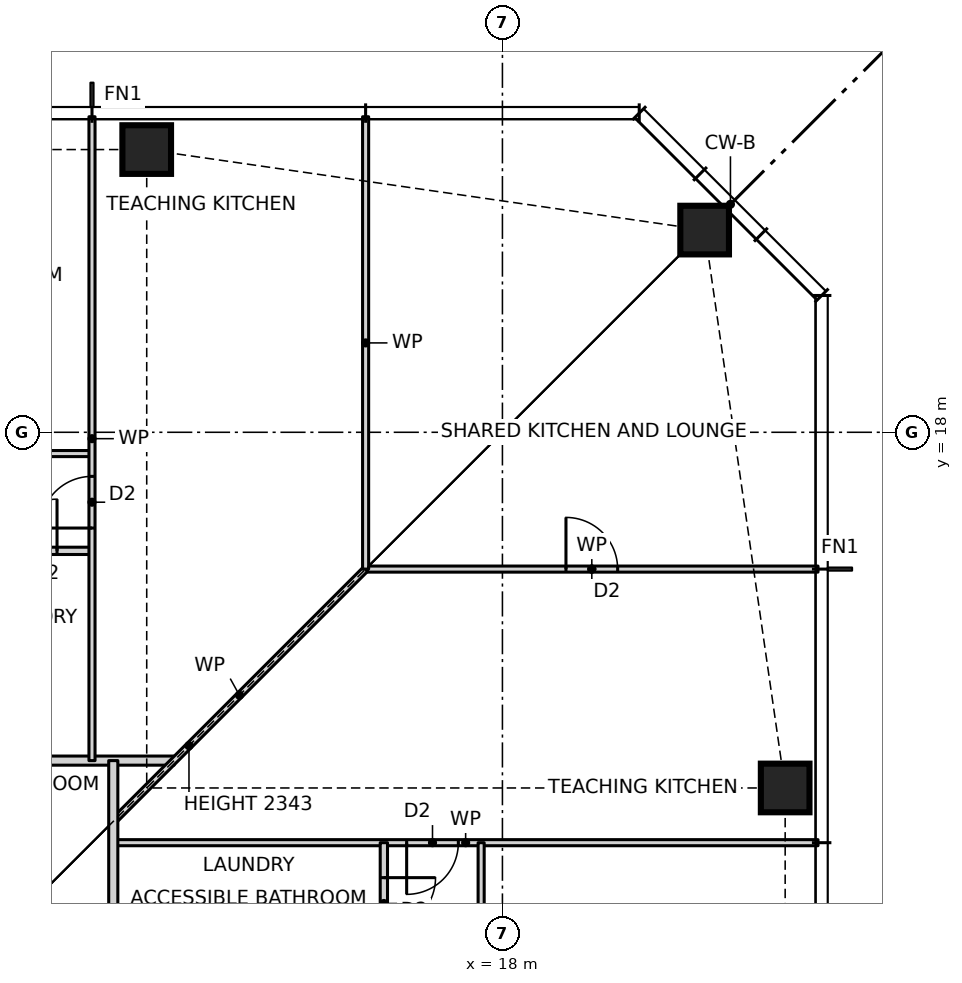
"""IFC4 building model, lengths in metres.
Left out: names, types, materials, properties, quantities, classifications, styles, units other than length and angle.
Written with IfcOpenShell. Run it as: python <this file> out.ifc"""

import sys

from ifc_helpers import new_model, si_unit, direction, frame, frame_2d, origin, origin_2d, place, context, subcontext, project, spatial, rectangle, hollow_rectangle, extrude, element, fill, save


model = new_model("IFC4")
c1 = context("Model", 3, precision=1e-05, world=origin(), true_north=direction((0.0, 1.0)))
c2 = subcontext(c1, "Body", "Model", "MODEL_VIEW")
j1 = project(units=[si_unit("LENGTHUNIT", "METRE"), si_unit("PLANEANGLEUNIT", "RADIAN")], contexts=[c1])
p1 = place(None, origin())
s1 = spatial("IfcSite", under=j1, at=p1, CompositionType="ELEMENT")
p2 = place(p1, origin())
s2 = spatial("IfcBuilding", under=s1, at=p2, CompositionType="ELEMENT")
p3 = place(p2, frame((0.0, 0.0, 60.5)))
s3 = spatial("IfcBuildingStorey", under=s2, at=p3, CompositionType="ELEMENT", Elevation=60.5)
for number, where, z_axis, x_axis in (
    (1, (22.65, 12.15, 0.0), (0.0, 0.0, 1.0), (1.0, 0.0, 0.0)),
    (2, (21.326, 21.326, 0.0), (0.0, 0.0, 1.0), (1.0, 0.0, 0.0)),
    (3, (12.15, 22.65, 0.0), (0.0, 0.0, 1.0), (1.0, 0.0, 0.0)),
):
    element("IfcColumn", number, at=place(p3, frame(where, z_axis=z_axis, x_axis=x_axis)), inside=s3, PredefinedType="COLUMN", context=c2, shape_type="SweptSolid", body=[
        extrude(hollow_rectangle(XDim=0.8, YDim=0.8, WallThickness=0.09, at=origin_2d()), origin(), (0.0, 0.0, 1.0), 3.5),
    ])
p4 = place(p3, frame((11.6, 11.25, 0.0), z_axis=(0.0, 0.0, 1.0), x_axis=(1.0, 0.0, 0.0)))
e4 = element("IfcWall", 4, at=p4, inside=s3, PredefinedType="PARTITIONING", context=c2, shape_type="SweptSolid", body=[
    extrude(rectangle(XDim=11.59, YDim=0.1, at=frame_2d((5.795, 0.0))), origin(), (0.0, 0.0, 1.0), 3.27),
])
p5 = place(p4, frame((4.825, 0.0, 0.0)))
e5 = element("IfcOpeningElement", 5, at=p5, cuts=e4, PredefinedType="OPENING", context=c2, shape_type="SweptSolid", body=[
    extrude(rectangle(XDim=0.85, YDim=2.1, at=frame_2d((0.425, 1.05))), frame((0.0, 0.06, 0.0), z_axis=(0.0, -1.0, 0.0), x_axis=(1.0, 0.0, 0.0)), (0.0, 0.0, 1.0), 0.12),
])
p6 = place(p3, frame((-12.6, 12.6, 0.0), z_axis=(0.0, 0.0, 1.0), x_axis=(1.0, 0.0, 0.0)))
e6 = element("IfcWall", 6, at=p6, inside=s3, PredefinedType="PARTITIONING", context=c2, shape_type="SweptSolid", body=[
    extrude(rectangle(XDim=25.2, YDim=0.15, at=frame_2d((12.6, 0.0))), origin(), (0.0, 0.0, 1.0), 3.27),
])
p7 = place(p6, frame((11.505, 0.0, 0.0)))
e7 = element("IfcOpeningElement", 7, at=p7, cuts=e6, PredefinedType="OPENING", context=c2, shape_type="SweptSolid", body=[
    extrude(rectangle(XDim=1.0, YDim=2.1, at=frame_2d((0.5, 1.05))), frame((0.0, 0.085, 0.0), z_axis=(0.0, -1.0, 0.0), x_axis=(1.0, 0.0, 0.0)), (0.0, 0.0, 1.0), 0.17),
])
p8 = place(p3, frame((15.75, 15.75, 0.0), z_axis=(0.0, 0.0, 1.0), x_axis=(1.0, 0.0, 0.0)))
e8 = element("IfcWall", 8, at=p8, inside=s3, PredefinedType="PARTITIONING", context=c2, shape_type="SweptSolid", body=[
    extrude(rectangle(XDim=7.44, YDim=0.1, at=frame_2d((3.72, 0.0))), origin(), (0.0, 0.0, 1.0), 3.27),
])
p9 = place(p8, frame((3.295, 0.0, 0.0)))
e9 = element("IfcOpeningElement", 9, at=p9, cuts=e8, PredefinedType="OPENING", context=c2, shape_type="SweptSolid", body=[
    extrude(rectangle(XDim=0.85, YDim=2.1, at=frame_2d((0.425, 1.05))), frame((0.0, 0.06, 0.0), z_axis=(0.0, -1.0, 0.0), x_axis=(1.0, 0.0, 0.0)), (0.0, 0.0, 1.0), 0.12),
])
p10 = place(p3, frame((5.65, 16.05, 0.0), z_axis=(0.0, 0.0, 1.0), x_axis=(1.0, 0.0, 0.0)))
e10 = element("IfcWall", 10, at=p10, inside=s3, PredefinedType="PARTITIONING", context=c2, shape_type="SweptSolid", body=[
    extrude(rectangle(XDim=5.6, YDim=0.12, at=frame_2d((2.8, 0.0))), origin(), (0.0, 0.0, 1.0), 3.27),
])
p11 = place(p10, frame((4.175, 0.0, 0.0)))
e11 = element("IfcOpeningElement", 11, at=p11, cuts=e10, PredefinedType="OPENING", context=c2, shape_type="SweptSolid", body=[
    extrude(rectangle(XDim=0.85, YDim=2.1, at=frame_2d((0.425, 1.05))), frame((0.0, 0.07, 0.0), z_axis=(0.0, -1.0, 0.0), x_axis=(1.0, 0.0, 0.0)), (0.0, 0.0, 1.0), 0.14),
])
p12 = place(p10, frame((2.225, 0.0, 0.0)))
e12 = element("IfcOpeningElement", 12, at=p12, cuts=e10, PredefinedType="OPENING", context=c2, shape_type="SweptSolid", body=[
    extrude(rectangle(XDim=0.85, YDim=2.1, at=frame_2d((0.425, 1.05))), frame((0.0, 0.07, 0.0), z_axis=(0.0, -1.0, 0.0), x_axis=(1.0, 0.0, 0.0)), (0.0, 0.0, 1.0), 0.14),
])
p13 = place(p3, frame((-15.75, 17.65, 0.0), z_axis=(0.0, 0.0, 1.0), x_axis=(1.0, 0.0, 0.0)))
e13 = element("IfcWall", 13, at=p13, inside=s3, PredefinedType="PARTITIONING", context=c2, shape_type="SweptSolid", body=[
    extrude(rectangle(XDim=27.0, YDim=0.1, at=frame_2d((13.5, 0.0))), origin(), (0.0, 0.0, 1.0), 3.27),
])
p14 = place(p13, frame((24.3, 0.0, 0.0)))
e14 = element("IfcOpeningElement", 14, at=p14, cuts=e13, PredefinedType="OPENING", context=c2, shape_type="SweptSolid", body=[
    extrude(rectangle(XDim=0.9, YDim=2.1, at=frame_2d((0.45, 1.05))), frame((0.0, 0.06, 0.0), z_axis=(0.0, -1.0, 0.0), x_axis=(1.0, 0.0, 0.0)), (0.0, 0.0, 1.0), 0.12),
])
p15 = place(p13, frame((19.8, 0.0, 0.0)))
e15 = element("IfcOpeningElement", 15, at=p15, cuts=e13, PredefinedType="OPENING", context=c2, shape_type="SweptSolid", body=[
    extrude(rectangle(XDim=0.9, YDim=2.1, at=frame_2d((0.45, 1.05))), frame((0.0, 0.06, 0.0), z_axis=(0.0, -1.0, 0.0), x_axis=(1.0, 0.0, 0.0)), (0.0, 0.0, 1.0), 0.12),
])
p16 = place(p13, frame((15.3, 0.0, 0.0)))
e16 = element("IfcOpeningElement", 16, at=p16, cuts=e13, PredefinedType="OPENING", context=c2, shape_type="SweptSolid", body=[
    extrude(rectangle(XDim=0.9, YDim=2.1, at=frame_2d((0.45, 1.05))), frame((0.0, 0.06, 0.0), z_axis=(0.0, -1.0, 0.0), x_axis=(1.0, 0.0, 0.0)), (0.0, 0.0, 1.0), 0.12),
])
p17 = place(p13, frame((10.8, 0.0, 0.0)))
e17 = element("IfcOpeningElement", 17, at=p17, cuts=e13, PredefinedType="OPENING", context=c2, shape_type="SweptSolid", body=[
    extrude(rectangle(XDim=0.9, YDim=2.1, at=frame_2d((0.45, 1.05))), frame((0.0, 0.06, 0.0), z_axis=(0.0, -1.0, 0.0), x_axis=(1.0, 0.0, 0.0)), (0.0, 0.0, 1.0), 0.12),
])
p18 = place(p13, frame((6.3, 0.0, 0.0)))
e18 = element("IfcOpeningElement", 18, at=p18, cuts=e13, PredefinedType="OPENING", context=c2, shape_type="SweptSolid", body=[
    extrude(rectangle(XDim=0.9, YDim=2.1, at=frame_2d((0.45, 1.05))), frame((0.0, 0.06, 0.0), z_axis=(0.0, -1.0, 0.0), x_axis=(1.0, 0.0, 0.0)), (0.0, 0.0, 1.0), 0.12),
])
p19 = place(p13, frame((1.8, 0.0, 0.0)))
e19 = element("IfcOpeningElement", 19, at=p19, cuts=e13, PredefinedType="OPENING", context=c2, shape_type="SweptSolid", body=[
    extrude(rectangle(XDim=0.9, YDim=2.1, at=frame_2d((0.45, 1.05))), frame((0.0, 0.06, 0.0), z_axis=(0.0, -1.0, 0.0), x_axis=(1.0, 0.0, 0.0)), (0.0, 0.0, 1.0), 0.12),
])
p20 = place(p3, frame((11.6, 11.6, 0.0), z_axis=(0.0, 0.0, 1.0), x_axis=(0.707106781187, 0.707106781187, 0.0)))
e20 = element("IfcWall", 20, at=p20, inside=s3, PredefinedType="PARTITIONING", context=c2, shape_type="SweptSolid", body=[
    extrude(rectangle(XDim=5.869, YDim=0.1, at=frame_2d((2.935, 0.0))), origin(), (0.0, 0.0, 1.0), 2.343),
])
p21 = place(p3, frame((17.65, -15.75, 0.0), z_axis=(0.0, 0.0, 1.0), x_axis=(0.0, 1.0, 0.0)))
e21 = element("IfcWall", 21, at=p21, inside=s3, PredefinedType="PARTITIONING", context=c2, shape_type="SweptSolid", body=[
    extrude(rectangle(XDim=27.0, YDim=0.1, at=frame_2d((13.5, 0.0))), origin(), (0.0, 0.0, 1.0), 3.27),
])
p22 = place(p21, frame((1.8, 0.0, 0.0)))
e22 = element("IfcOpeningElement", 22, at=p22, cuts=e21, PredefinedType="OPENING", context=c2, shape_type="SweptSolid", body=[
    extrude(rectangle(XDim=0.9, YDim=2.1, at=frame_2d((0.45, 1.05))), frame((0.0, 0.06, 0.0), z_axis=(0.0, -1.0, 0.0), x_axis=(1.0, 0.0, 0.0)), (0.0, 0.0, 1.0), 0.12),
])
p23 = place(p21, frame((6.3, 0.0, 0.0)))
e23 = element("IfcOpeningElement", 23, at=p23, cuts=e21, PredefinedType="OPENING", context=c2, shape_type="SweptSolid", body=[
    extrude(rectangle(XDim=0.9, YDim=2.1, at=frame_2d((0.45, 1.05))), frame((0.0, 0.06, 0.0), z_axis=(0.0, -1.0, 0.0), x_axis=(1.0, 0.0, 0.0)), (0.0, 0.0, 1.0), 0.12),
])
p24 = place(p21, frame((10.8, 0.0, 0.0)))
e24 = element("IfcOpeningElement", 24, at=p24, cuts=e21, PredefinedType="OPENING", context=c2, shape_type="SweptSolid", body=[
    extrude(rectangle(XDim=0.9, YDim=2.1, at=frame_2d((0.45, 1.05))), frame((0.0, 0.06, 0.0), z_axis=(0.0, -1.0, 0.0), x_axis=(1.0, 0.0, 0.0)), (0.0, 0.0, 1.0), 0.12),
])
p25 = place(p21, frame((15.3, 0.0, 0.0)))
e25 = element("IfcOpeningElement", 25, at=p25, cuts=e21, PredefinedType="OPENING", context=c2, shape_type="SweptSolid", body=[
    extrude(rectangle(XDim=0.9, YDim=2.1, at=frame_2d((0.45, 1.05))), frame((0.0, 0.06, 0.0), z_axis=(0.0, -1.0, 0.0), x_axis=(1.0, 0.0, 0.0)), (0.0, 0.0, 1.0), 0.12),
])
p26 = place(p21, frame((19.8, 0.0, 0.0)))
e26 = element("IfcOpeningElement", 26, at=p26, cuts=e21, PredefinedType="OPENING", context=c2, shape_type="SweptSolid", body=[
    extrude(rectangle(XDim=0.9, YDim=2.1, at=frame_2d((0.45, 1.05))), frame((0.0, 0.06, 0.0), z_axis=(0.0, -1.0, 0.0), x_axis=(1.0, 0.0, 0.0)), (0.0, 0.0, 1.0), 0.12),
])
p27 = place(p21, frame((24.3, 0.0, 0.0)))
e27 = element("IfcOpeningElement", 27, at=p27, cuts=e21, PredefinedType="OPENING", context=c2, shape_type="SweptSolid", body=[
    extrude(rectangle(XDim=0.9, YDim=2.1, at=frame_2d((0.45, 1.05))), frame((0.0, 0.06, 0.0), z_axis=(0.0, -1.0, 0.0), x_axis=(1.0, 0.0, 0.0)), (0.0, 0.0, 1.0), 0.12),
])
p28 = place(p3, frame((16.05, 6.15, 0.0), z_axis=(0.0, 0.0, 1.0), x_axis=(0.0, 1.0, 0.0)))
e28 = element("IfcWall", 28, at=p28, inside=s3, PredefinedType="PARTITIONING", context=c2, shape_type="SweptSolid", body=[
    extrude(rectangle(XDim=5.1, YDim=0.12, at=frame_2d((2.55, 0.0))), origin(), (0.0, 0.0, 1.0), 3.27),
])
p29 = place(p28, frame((1.875, 0.0, 0.0)))
e29 = element("IfcOpeningElement", 29, at=p29, cuts=e28, PredefinedType="OPENING", context=c2, shape_type="SweptSolid", body=[
    extrude(rectangle(XDim=0.85, YDim=2.1, at=frame_2d((0.425, 1.05))), frame((0.0, 0.07, 0.0), z_axis=(0.0, -1.0, 0.0), x_axis=(1.0, 0.0, 0.0)), (0.0, 0.0, 1.0), 0.14),
])
p30 = place(p28, frame((3.675, 0.0, 0.0)))
e30 = element("IfcOpeningElement", 30, at=p30, cuts=e28, PredefinedType="OPENING", context=c2, shape_type="SweptSolid", body=[
    extrude(rectangle(XDim=0.85, YDim=2.1, at=frame_2d((0.425, 1.05))), frame((0.0, 0.07, 0.0), z_axis=(0.0, -1.0, 0.0), x_axis=(1.0, 0.0, 0.0)), (0.0, 0.0, 1.0), 0.14),
])
p31 = place(p3, frame((15.75, 15.75, 0.0), z_axis=(0.0, 0.0, 1.0), x_axis=(0.0, 1.0, 0.0)))
e31 = element("IfcWall", 31, at=p31, inside=s3, PredefinedType="PARTITIONING", context=c2, shape_type="SweptSolid", body=[
    extrude(rectangle(XDim=7.44, YDim=0.1, at=frame_2d((3.72, 0.0))), origin(), (0.0, 0.0, 1.0), 3.27),
])
p32 = place(p3, frame((11.6, -11.6, 0.0), z_axis=(0.0, 0.0, 1.0), x_axis=(0.0, 1.0, 0.0)))
e32 = element("IfcWall", 32, at=p32, inside=s3, PredefinedType="PARTITIONING", context=c2, shape_type="SweptSolid", body=[
    extrude(rectangle(XDim=24.2, YDim=0.15, at=frame_2d((12.1, 0.0))), origin(), (0.0, 0.0, 1.0), 3.27),
])
p33 = place(p32, frame((16.05, 0.0, 0.0)))
e33 = element("IfcOpeningElement", 33, at=p33, cuts=e32, PredefinedType="OPENING", context=c2, shape_type="SweptSolid", body=[
    extrude(rectangle(XDim=1.0, YDim=2.1, at=frame_2d((0.5, 1.05))), frame((0.0, 0.085, 0.0), z_axis=(0.0, -1.0, 0.0), x_axis=(1.0, 0.0, 0.0)), (0.0, 0.0, 1.0), 0.17),
])
p34 = place(p3, frame((11.25, 12.6, 0.0), z_axis=(0.0, 0.0, 1.0), x_axis=(0.0, 1.0, 0.0)))
e34 = element("IfcWall", 34, at=p34, inside=s3, PredefinedType="PARTITIONING", context=c2, shape_type="SweptSolid", body=[
    extrude(rectangle(XDim=10.59, YDim=0.1, at=frame_2d((5.295, 0.0))), origin(), (0.0, 0.0, 1.0), 3.27),
])
p35 = place(p34, frame((3.825, 0.0, 0.0)))
e35 = element("IfcOpeningElement", 35, at=p35, cuts=e34, PredefinedType="OPENING", context=c2, shape_type="SweptSolid", body=[
    extrude(rectangle(XDim=0.85, YDim=2.1, at=frame_2d((0.425, 1.05))), frame((0.0, 0.06, 0.0), z_axis=(0.0, -1.0, 0.0), x_axis=(1.0, 0.0, 0.0)), (0.0, 0.0, 1.0), 0.12),
])
p36 = place(p30, frame((0.85, 0.0, 0.0), z_axis=(0.0, 0.0, 1.0), x_axis=(-1.0, 0.0, 0.0)))
e36 = element("IfcDoor", 36, at=p36, inside=s3, OperationType="SINGLE_SWING_LEFT", PredefinedType="DOOR", context=c2, shape_type="SweptSolid", body=[
    extrude(rectangle(XDim=0.85, YDim=2.1, at=frame_2d((0.425, 1.05))), frame((0.0, 0.025, 0.0), z_axis=(0.0, -1.0, 0.0), x_axis=(1.0, 0.0, 0.0)), (0.0, 0.0, 1.0), 0.05),
])
fill(e30, e36)
p37 = place(p5, frame((0.85, 0.0, 0.0), z_axis=(0.0, 0.0, 1.0), x_axis=(-1.0, 0.0, 0.0)))
e37 = element("IfcDoor", 37, at=p37, inside=s3, OperationType="SINGLE_SWING_RIGHT", PredefinedType="DOOR", context=c2, shape_type="SweptSolid", body=[
    extrude(rectangle(XDim=0.85, YDim=2.1, at=frame_2d((0.425, 1.05))), frame((0.0, 0.025, 0.0), z_axis=(0.0, -1.0, 0.0), x_axis=(1.0, 0.0, 0.0)), (0.0, 0.0, 1.0), 0.05),
])
fill(e5, e37)
p38 = place(p35, origin())
e38 = element("IfcDoor", 38, at=p38, inside=s3, OperationType="SINGLE_SWING_LEFT", PredefinedType="DOOR", context=c2, shape_type="SweptSolid", body=[
    extrude(rectangle(XDim=0.85, YDim=2.1, at=frame_2d((0.425, 1.05))), frame((0.0, 0.025, 0.0), z_axis=(0.0, -1.0, 0.0), x_axis=(1.0, 0.0, 0.0)), (0.0, 0.0, 1.0), 0.05),
])
fill(e35, e38)
p39 = place(p11, origin())
e39 = element("IfcDoor", 39, at=p39, inside=s3, OperationType="SINGLE_SWING_RIGHT", PredefinedType="DOOR", context=c2, shape_type="SweptSolid", body=[
    extrude(rectangle(XDim=0.85, YDim=2.1, at=frame_2d((0.425, 1.05))), frame((0.0, 0.025, 0.0), z_axis=(0.0, -1.0, 0.0), x_axis=(1.0, 0.0, 0.0)), (0.0, 0.0, 1.0), 0.05),
])
fill(e11, e39)
p40 = place(p9, origin())
e40 = element("IfcDoor", 40, at=p40, inside=s3, OperationType="SINGLE_SWING_LEFT", PredefinedType="DOOR", context=c2, shape_type="SweptSolid", body=[
    extrude(rectangle(XDim=0.85, YDim=2.1, at=frame_2d((0.425, 1.05))), frame((0.0, 0.025, 0.0), z_axis=(0.0, -1.0, 0.0), x_axis=(1.0, 0.0, 0.0)), (0.0, 0.0, 1.0), 0.05),
])
fill(e9, e40)
save(model, sys.argv[1])
